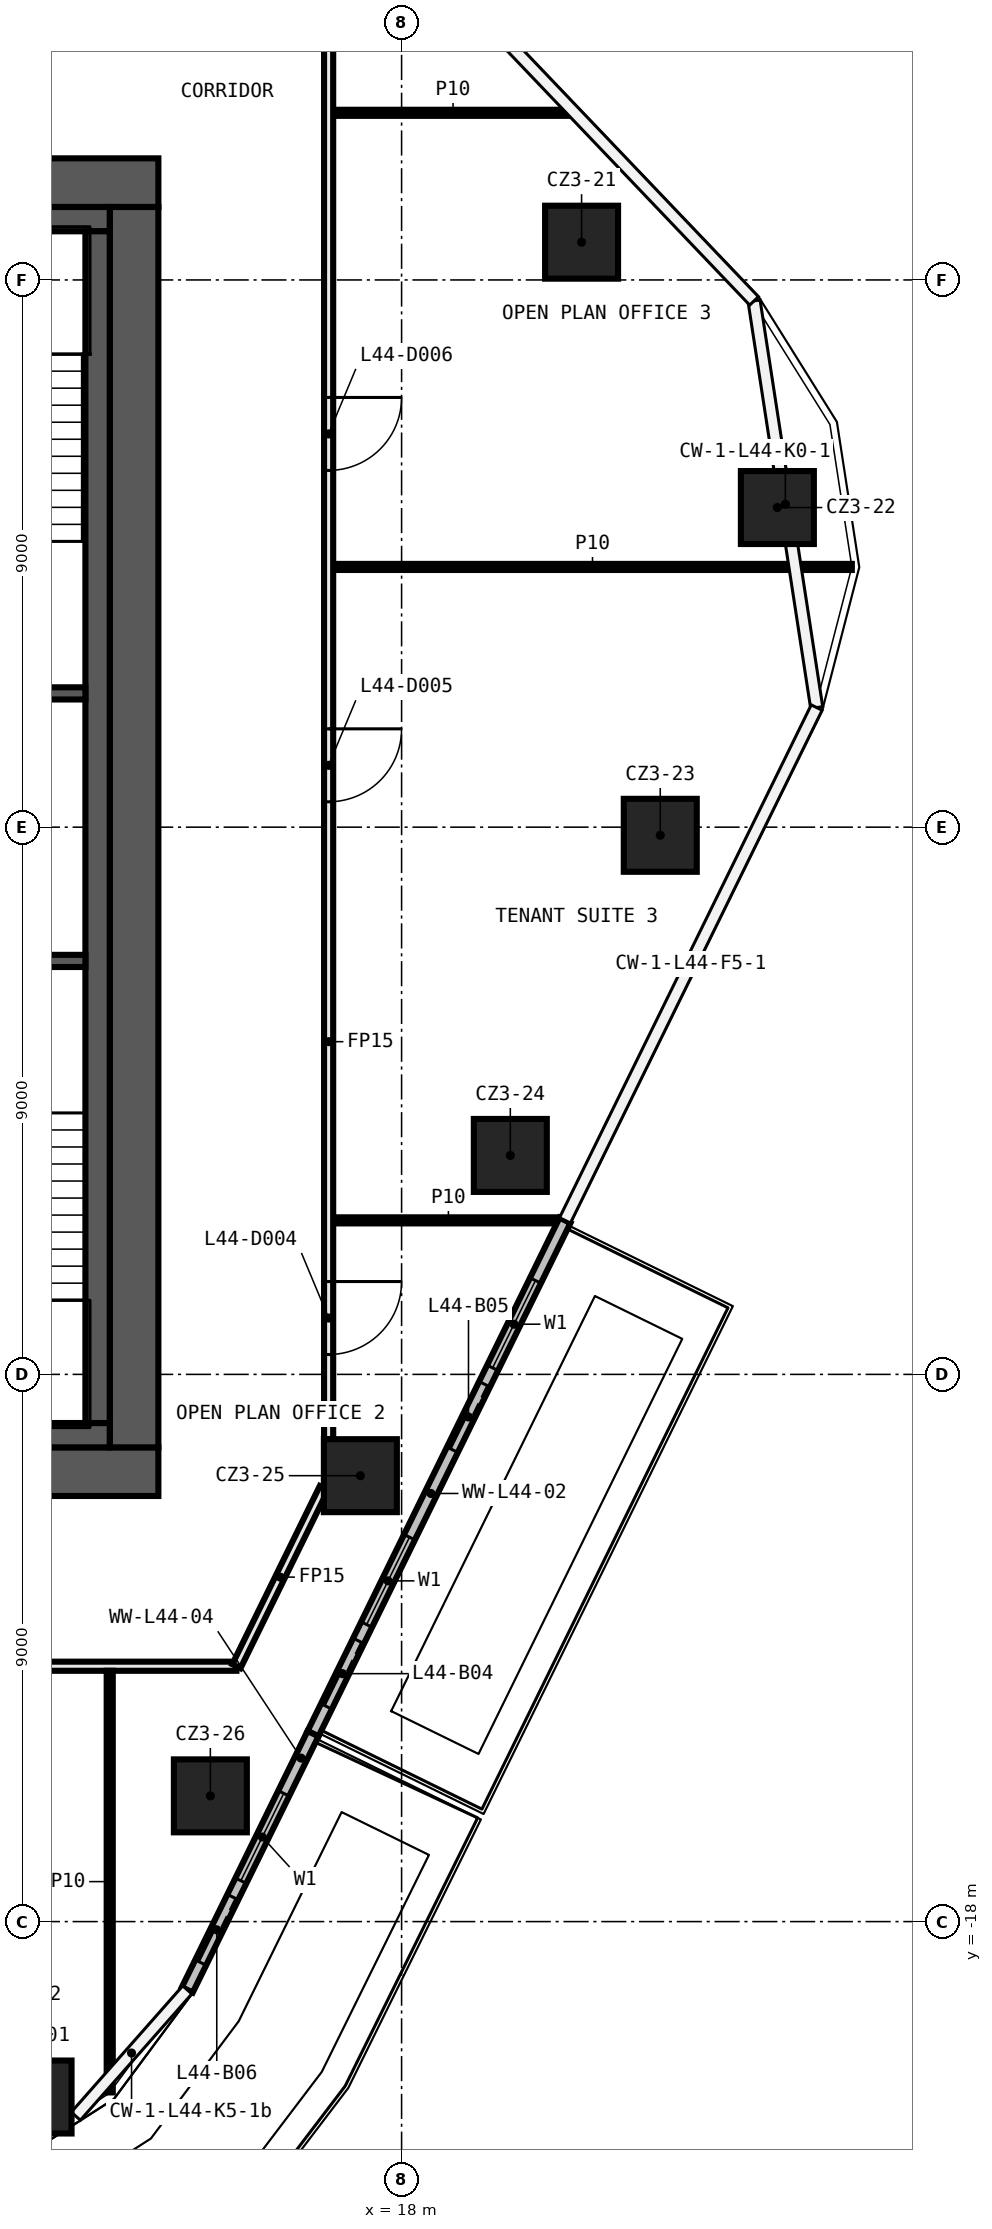
"""IFC4 building model, lengths in metres.
Left out: names, types, materials, properties, quantities, classifications, styles, units other than length and angle.
Written with IfcOpenShell. Run it as: python <this file> out.ifc"""

import sys

from ifc_helpers import new_model, si_unit, direction, frame, frame_2d, origin, origin_2d, place, context, subcontext, project, spatial, rectangle, extrude, element, fill, save


model = new_model("IFC4")
c1 = context("Model", 3, precision=1e-05, world=origin(), true_north=direction((0.0, 1.0)))
c2 = subcontext(c1, "Body", "Model", "MODEL_VIEW")
j1 = project(units=[si_unit("LENGTHUNIT", "METRE"), si_unit("PLANEANGLEUNIT", "RADIAN")], contexts=[c1])
p1 = place(None, origin())
s1 = spatial("IfcSite", under=j1, at=p1, CompositionType="ELEMENT")
p2 = place(p1, origin())
s2 = spatial("IfcBuilding", under=s1, at=p2, CompositionType="ELEMENT")
p3 = place(p2, frame((0.0, 0.0, 211.4)))
s3 = spatial("IfcBuildingStorey", under=s2, at=p3, CompositionType="ELEMENT", Elevation=211.4)
for number, where, z_axis, x_axis in (
    (1, (11.972, -20.885, 0.0), (0.0, 0.0, 1.0), (1.0, 0.0, 0.0)),
    (2, (20.96, 9.621, 0.0), (0.0, 0.0, 1.0), (1.0, 0.0, 0.0)),
    (3, (24.18, 5.257, 0.0), (0.0, 0.0, 1.0), (1.0, 0.0, 0.0)),
    (4, (22.254, -0.134, 0.0), (0.0, 0.0, 1.0), (1.0, 0.0, 0.0)),
    (5, (19.788, -5.399, 0.0), (0.0, 0.0, 1.0), (1.0, 0.0, 0.0)),
    (6, (17.322, -10.666, 0.0), (0.0, 0.0, 1.0), (1.0, 0.0, 0.0)),
    (7, (14.855, -15.932, 0.0), (0.0, 0.0, 1.0), (1.0, 0.0, 0.0)),
):
    element("IfcColumn", number, at=place(p3, frame(where, z_axis=z_axis, x_axis=x_axis)), inside=s3, PredefinedType="COLUMN", context=c2, shape_type="SweptSolid", body=[
        extrude(rectangle(XDim=1.2, YDim=1.2, at=origin_2d()), origin(), (0.0, 0.0, 1.0), 3.82),
    ])
p4 = place(p3, frame((15.283, -13.8, 0.0), z_axis=(0.0, 0.0, 1.0), x_axis=(-1.0, 0.0, 0.0)))
e8 = element("IfcWall", 8, at=p4, inside=s3, PredefinedType="PARTITIONING", context=c2, shape_type="SweptSolid", body=[
    extrude(rectangle(XDim=27.358, YDim=0.15, at=frame_2d((13.679, 0.0))), origin(), (0.0, 0.0, 1.0), 3.82),
])
p5 = place(p4, frame((20.117, 0.0, 0.0)))
e9 = element("IfcOpeningElement", 9, at=p5, cuts=e8, PredefinedType="OPENING", context=c2, shape_type="SweptSolid", body=[
    extrude(rectangle(XDim=1.2, YDim=2.1, at=frame_2d((0.6, 1.05))), frame((0.0, 0.085, 0.0), z_axis=(0.0, -1.0, 0.0), x_axis=(1.0, 0.0, 0.0)), (0.0, 0.0, 1.0), 0.17),
])
p6 = place(p4, frame((15.905, 0.0, 0.0)))
e10 = element("IfcOpeningElement", 10, at=p6, cuts=e8, PredefinedType="OPENING", context=c2, shape_type="SweptSolid", body=[
    extrude(rectangle(XDim=1.2, YDim=2.1, at=frame_2d((0.6, 1.05))), frame((0.0, 0.085, 0.0), z_axis=(0.0, -1.0, 0.0), x_axis=(1.0, 0.0, 0.0)), (0.0, 0.0, 1.0), 0.17),
])
p7 = place(p4, frame((7.48, 0.0, 0.0)))
e11 = element("IfcOpeningElement", 11, at=p7, cuts=e8, PredefinedType="OPENING", context=c2, shape_type="SweptSolid", body=[
    extrude(rectangle(XDim=1.2, YDim=2.1, at=frame_2d((0.6, 1.05))), frame((0.0, 0.085, 0.0), z_axis=(0.0, -1.0, 0.0), x_axis=(1.0, 0.0, 0.0)), (0.0, 0.0, 1.0), 0.17),
])
p8 = place(p3, frame((16.875, -6.467, 0.0), z_axis=(0.0, 0.0, 1.0), x_axis=(1.0, 0.0, 0.0)))
e12 = element("IfcWall", 12, at=p8, inside=s3, PredefinedType="PARTITIONING", context=c2, shape_type="SweptSolid", body=[
    extrude(rectangle(XDim=3.79, YDim=0.1, at=frame_2d((1.895, 0.0))), origin(), (0.0, 0.0, 1.0), 3.82),
])
p9 = place(p3, frame((16.875, 4.28, 0.0), z_axis=(0.0, 0.0, 1.0), x_axis=(1.0, 0.0, 0.0)))
e13 = element("IfcWall", 13, at=p9, inside=s3, PredefinedType="PARTITIONING", context=c2, shape_type="SweptSolid", body=[
    extrude(rectangle(XDim=8.529, YDim=0.1, at=frame_2d((4.265, 0.0))), origin(), (0.0, 0.0, 1.0), 3.82),
])
p10 = place(p3, frame((16.875, 11.749, 0.0), z_axis=(0.0, 0.0, 1.0), x_axis=(1.0, 0.0, 0.0)))
e14 = element("IfcWall", 14, at=p10, inside=s3, PredefinedType="PARTITIONING", context=c2, shape_type="SweptSolid", body=[
    extrude(rectangle(XDim=3.943, YDim=0.1, at=frame_2d((1.972, 0.0))), origin(), (0.0, 0.0, 1.0), 3.82),
])
p11 = place(p3, frame((15.283, -13.8, 0.0), z_axis=(0.0, 0.0, 1.0), x_axis=(0.440561446279, 0.897722458253, 0.0)))
e15 = element("IfcWall", 15, at=p11, inside=s3, PredefinedType="PARTITIONING", context=c2, shape_type="SweptSolid", body=[
    extrude(rectangle(XDim=3.265, YDim=0.15, at=frame_2d((1.633, 0.0))), origin(), (0.0, 0.0, 1.0), 3.82),
])
p12 = place(p3, frame((16.8, 13.106, 0.0), z_axis=(0.0, 0.0, 1.0), x_axis=(0.0, -1.0, 0.0)))
e16 = element("IfcWall", 16, at=p12, inside=s3, PredefinedType="PARTITIONING", context=c2, shape_type="SweptSolid", body=[
    extrude(rectangle(XDim=23.172, YDim=0.15, at=frame_2d((11.586, 0.0))), origin(), (0.0, 0.0, 1.0), 3.82),
])
p13 = place(p12, frame((20.579, 0.0, 0.0)))
e17 = element("IfcOpeningElement", 17, at=p13, cuts=e16, PredefinedType="OPENING", context=c2, shape_type="SweptSolid", body=[
    extrude(rectangle(XDim=1.2, YDim=2.1, at=frame_2d((0.6, 1.05))), frame((0.0, 0.085, 0.0), z_axis=(0.0, -1.0, 0.0), x_axis=(1.0, 0.0, 0.0)), (0.0, 0.0, 1.0), 0.17),
])
p14 = place(p12, frame((11.489, 0.0, 0.0)))
e18 = element("IfcOpeningElement", 18, at=p14, cuts=e16, PredefinedType="OPENING", context=c2, shape_type="SweptSolid", body=[
    extrude(rectangle(XDim=1.2, YDim=2.1, at=frame_2d((0.6, 1.05))), frame((0.0, 0.085, 0.0), z_axis=(0.0, -1.0, 0.0), x_axis=(1.0, 0.0, 0.0)), (0.0, 0.0, 1.0), 0.17),
])
p15 = place(p12, frame((6.039, 0.0, 0.0)))
e19 = element("IfcOpeningElement", 19, at=p15, cuts=e16, PredefinedType="OPENING", context=c2, shape_type="SweptSolid", body=[
    extrude(rectangle(XDim=1.2, YDim=2.1, at=frame_2d((0.6, 1.05))), frame((0.0, 0.085, 0.0), z_axis=(0.0, -1.0, 0.0), x_axis=(1.0, 0.0, 0.0)), (0.0, 0.0, 1.0), 0.17),
])
p16 = place(p3, frame((13.2, -20.81, 0.0), z_axis=(0.0, 0.0, 1.0), x_axis=(0.0, 1.0, 0.0)))
e20 = element("IfcWall", 20, at=p16, inside=s3, PredefinedType="PARTITIONING", context=c2, shape_type="SweptSolid", body=[
    extrude(rectangle(XDim=6.935, YDim=0.1, at=frame_2d((3.467, 0.0))), origin(), (0.0, 0.0, 1.0), 3.82),
])
p17 = place(p3, frame((16.543, -14.91, 0.0), z_axis=(0.0, 0.0, 1.0), x_axis=(0.440597504926, 0.897704761407, 0.0)))
e21 = element("IfcWall", 21, at=p17, inside=s3, PredefinedType="SOLIDWALL", context=c2, shape_type="SweptSolid", body=[
    extrude(rectangle(XDim=9.405, YDim=0.2, at=frame_2d((4.703, 0.0))), origin(), (0.0, 0.0, 1.0), 3.82),
])
p18 = place(p17, frame((2.0, 0.0, 0.6)))
e22 = element("IfcOpeningElement", 22, at=p18, cuts=e21, PredefinedType="OPENING", context=c2, shape_type="SweptSolid", body=[
    extrude(rectangle(XDim=1.6, YDim=2.4, at=frame_2d((0.8, 1.2))), frame((0.0, 0.11, 0.0), z_axis=(0.0, -1.0, 0.0), x_axis=(1.0, 0.0, 0.0)), (0.0, 0.0, 1.0), 0.22),
])
p19 = place(p17, frame((0.5, 0.0, 0.0)))
e23 = element("IfcOpeningElement", 23, at=p19, cuts=e21, PredefinedType="OPENING", context=c2, shape_type="SweptSolid", body=[
    extrude(rectangle(XDim=1.2, YDim=2.4, at=frame_2d((0.6, 1.2))), frame((0.0, 0.11, 0.0), z_axis=(0.0, -1.0, 0.0), x_axis=(1.0, 0.0, 0.0)), (0.0, 0.0, 1.0), 0.22),
])
p20 = place(p17, frame((6.702, 0.0, 0.6)))
e24 = element("IfcOpeningElement", 24, at=p20, cuts=e21, PredefinedType="OPENING", context=c2, shape_type="SweptSolid", body=[
    extrude(rectangle(XDim=1.6, YDim=2.4, at=frame_2d((0.8, 1.2))), frame((0.0, 0.11, 0.0), z_axis=(0.0, -1.0, 0.0), x_axis=(1.0, 0.0, 0.0)), (0.0, 0.0, 1.0), 0.22),
])
p21 = place(p17, frame((5.202, 0.0, 0.0)))
e25 = element("IfcOpeningElement", 25, at=p21, cuts=e21, PredefinedType="OPENING", context=c2, shape_type="SweptSolid", body=[
    extrude(rectangle(XDim=1.2, YDim=2.4, at=frame_2d((0.6, 1.2))), frame((0.0, 0.11, 0.0), z_axis=(0.0, -1.0, 0.0), x_axis=(1.0, 0.0, 0.0)), (0.0, 0.0, 1.0), 0.22),
])
p22 = place(p3, frame((14.476, -19.123, 0.0), z_axis=(0.0, 0.0, 1.0), x_axis=(0.440605358917, 0.897700906591, 0.0)))
e26 = element("IfcWall", 26, at=p22, inside=s3, PredefinedType="SOLIDWALL", context=c2, shape_type="SweptSolid", body=[
    extrude(rectangle(XDim=4.693, YDim=0.2, at=frame_2d((2.347, 0.0))), origin(), (0.0, 0.0, 1.0), 3.82),
])
p23 = place(p22, frame((2.0, 0.0, 0.6)))
e27 = element("IfcOpeningElement", 27, at=p23, cuts=e26, PredefinedType="OPENING", context=c2, shape_type="SweptSolid", body=[
    extrude(rectangle(XDim=1.6, YDim=2.4, at=frame_2d((0.8, 1.2))), frame((0.0, 0.11, 0.0), z_axis=(0.0, -1.0, 0.0), x_axis=(1.0, 0.0, 0.0)), (0.0, 0.0, 1.0), 0.22),
])
p24 = place(p22, frame((0.5, 0.0, 0.0)))
e28 = element("IfcOpeningElement", 28, at=p24, cuts=e26, PredefinedType="OPENING", context=c2, shape_type="SweptSolid", body=[
    extrude(rectangle(XDim=1.2, YDim=2.4, at=frame_2d((0.6, 1.2))), frame((0.0, 0.11, 0.0), z_axis=(0.0, -1.0, 0.0), x_axis=(1.0, 0.0, 0.0)), (0.0, 0.0, 1.0), 0.22),
])
p25 = place(p3, frame((-14.0, 10.6, 0.0), z_axis=(0.0, 0.0, 1.0), x_axis=(1.0, 0.0, 0.0)))
e29 = element("IfcWall", 29, at=p25, inside=s3, PredefinedType="SHEAR", context=c2, shape_type="SweptSolid", body=[
    extrude(rectangle(XDim=28.0, YDim=0.8, at=frame_2d((14.0, 0.0))), origin(), (0.0, 0.0, 1.0), 3.82),
])
p26 = place(p25, frame((15.9, 0.0, 0.0)))
e30 = element("IfcOpeningElement", 30, at=p26, cuts=e29, PredefinedType="OPENING", context=c2, shape_type="SweptSolid", body=[
    extrude(rectangle(XDim=1.6, YDim=2.1, at=frame_2d((0.8, 1.05))), frame((0.0, 0.41, 0.0), z_axis=(0.0, -1.0, 0.0), x_axis=(1.0, 0.0, 0.0)), (0.0, 0.0, 1.0), 0.82),
])
p27 = place(p3, frame((14.0, -10.6, 0.0), z_axis=(0.0, 0.0, 1.0), x_axis=(-1.0, 0.0, 0.0)))
e31 = element("IfcWall", 31, at=p27, inside=s3, PredefinedType="SHEAR", context=c2, shape_type="SweptSolid", body=[
    extrude(rectangle(XDim=28.0, YDim=0.8, at=frame_2d((14.0, 0.0))), origin(), (0.0, 0.0, 1.0), 3.82),
])
p28 = place(p27, frame((5.1, 0.0, 0.0)))
e32 = element("IfcOpeningElement", 32, at=p28, cuts=e31, PredefinedType="OPENING", context=c2, shape_type="SweptSolid", body=[
    extrude(rectangle(XDim=1.6, YDim=2.1, at=frame_2d((0.8, 1.05))), frame((0.0, 0.41, 0.0), z_axis=(0.0, -1.0, 0.0), x_axis=(1.0, 0.0, 0.0)), (0.0, 0.0, 1.0), 0.82),
])
p29 = place(p3, frame((13.6, 10.2, 0.0), z_axis=(0.0, 0.0, 1.0), x_axis=(0.0, -1.0, 0.0)))
e33 = element("IfcWall", 33, at=p29, inside=s3, PredefinedType="SHEAR", context=c2, shape_type="SweptSolid", body=[
    extrude(rectangle(XDim=20.4, YDim=0.8, at=frame_2d((10.2, 0.0))), origin(), (0.0, 0.0, 1.0), 3.82),
])
p30 = place(p3, frame((3.9, 10.0, 0.0), z_axis=(0.0, 0.0, 1.0), x_axis=(1.0, 0.0, 0.0)))
e34 = element("IfcWall", 34, at=p30, inside=s3, PredefinedType="SHEAR", context=c2, shape_type="SweptSolid", body=[
    extrude(rectangle(XDim=9.3, YDim=0.4, at=frame_2d((4.65, 0.0))), origin(), (0.0, 0.0, 1.0), 3.82),
])
p31 = place(p3, frame((13.2, -10.0, 0.0), z_axis=(0.0, 0.0, 1.0), x_axis=(-1.0, 0.0, 0.0)))
e35 = element("IfcWall", 35, at=p31, inside=s3, PredefinedType="SHEAR", context=c2, shape_type="SweptSolid", body=[
    extrude(rectangle(XDim=3.9, YDim=0.4, at=frame_2d((1.95, 0.0))), origin(), (0.0, 0.0, 1.0), 3.82),
])
p32 = place(p3, frame((13.0, 9.8, 0.0), z_axis=(0.0, 0.0, 1.0), x_axis=(0.0, -1.0, 0.0)))
e36 = element("IfcWall", 36, at=p32, inside=s3, PredefinedType="SHEAR", context=c2, shape_type="SweptSolid", body=[
    extrude(rectangle(XDim=19.6, YDim=0.4, at=frame_2d((9.8, 0.0))), origin(), (0.0, 0.0, 1.0), 3.82),
])
for number, where, z_axis, x_axis in (
    (37, (9.45, 2.2, 0.0), (0.0, 0.0, 1.0), (1.0, 0.0, 0.0)),
    (38, (9.45, -2.2, 0.0), (0.0, 0.0, 1.0), (1.0, 0.0, 0.0)),
):
    element("IfcWall", number, at=place(p3, frame(where, z_axis=z_axis, x_axis=x_axis)), inside=s3, PredefinedType="SHEAR", context=c2, shape_type="SweptSolid", body=[
        extrude(rectangle(XDim=3.35, YDim=0.2, at=frame_2d((1.675, 0.0))), origin(), (0.0, 0.0, 1.0), 3.82),
    ])
p33 = place(p13, origin())
e39 = element("IfcDoor", 39, at=p33, inside=s3, OperationType="SINGLE_SWING_LEFT", PredefinedType="DOOR", context=c2, shape_type="SweptSolid", body=[
    extrude(rectangle(XDim=1.2, YDim=2.1, at=frame_2d((0.6, 1.05))), frame((0.0, 0.025, 0.0), z_axis=(0.0, -1.0, 0.0), x_axis=(1.0, 0.0, 0.0)), (0.0, 0.0, 1.0), 0.05),
])
fill(e17, e39)
p34 = place(p14, origin())
e40 = element("IfcDoor", 40, at=p34, inside=s3, OperationType="SINGLE_SWING_RIGHT", PredefinedType="DOOR", context=c2, shape_type="SweptSolid", body=[
    extrude(rectangle(XDim=1.2, YDim=2.1, at=frame_2d((0.6, 1.05))), frame((0.0, 0.025, 0.0), z_axis=(0.0, -1.0, 0.0), x_axis=(1.0, 0.0, 0.0)), (0.0, 0.0, 1.0), 0.05),
])
fill(e18, e40)
p35 = place(p15, origin())
e41 = element("IfcDoor", 41, at=p35, inside=s3, OperationType="SINGLE_SWING_LEFT", PredefinedType="DOOR", context=c2, shape_type="SweptSolid", body=[
    extrude(rectangle(XDim=1.2, YDim=2.1, at=frame_2d((0.6, 1.05))), frame((0.0, 0.025, 0.0), z_axis=(0.0, -1.0, 0.0), x_axis=(1.0, 0.0, 0.0)), (0.0, 0.0, 1.0), 0.05),
])
fill(e19, e41)
p36 = place(p18, origin())
e42 = element("IfcWindow", 42, at=p36, inside=s3, PartitioningType="SINGLE_PANEL", PredefinedType="WINDOW", context=c2, shape_type="SweptSolid", body=[
    extrude(rectangle(XDim=1.6, YDim=2.4, at=frame_2d((0.8, 1.2))), frame((0.0, 0.03, 0.0), z_axis=(0.0, -1.0, 0.0), x_axis=(1.0, 0.0, 0.0)), (0.0, 0.0, 1.0), 0.06),
])
fill(e22, e42)
p37 = place(p19, origin())
e43 = element("IfcDoor", 43, at=p37, inside=s3, OperationType="SLIDING_TO_LEFT", PredefinedType="DOOR", context=c2, shape_type="SweptSolid", body=[
    extrude(rectangle(XDim=1.2, YDim=2.4, at=frame_2d((0.6, 1.2))), frame((0.0, 0.025, 0.0), z_axis=(0.0, -1.0, 0.0), x_axis=(1.0, 0.0, 0.0)), (0.0, 0.0, 1.0), 0.05),
])
fill(e23, e43)
p38 = place(p20, origin())
e44 = element("IfcWindow", 44, at=p38, inside=s3, PartitioningType="SINGLE_PANEL", PredefinedType="WINDOW", context=c2, shape_type="SweptSolid", body=[
    extrude(rectangle(XDim=1.6, YDim=2.4, at=frame_2d((0.8, 1.2))), frame((0.0, 0.03, 0.0), z_axis=(0.0, -1.0, 0.0), x_axis=(1.0, 0.0, 0.0)), (0.0, 0.0, 1.0), 0.06),
])
fill(e24, e44)
p39 = place(p21, origin())
e45 = element("IfcDoor", 45, at=p39, inside=s3, OperationType="SLIDING_TO_LEFT", PredefinedType="DOOR", context=c2, shape_type="SweptSolid", body=[
    extrude(rectangle(XDim=1.2, YDim=2.4, at=frame_2d((0.6, 1.2))), frame((0.0, 0.025, 0.0), z_axis=(0.0, -1.0, 0.0), x_axis=(1.0, 0.0, 0.0)), (0.0, 0.0, 1.0), 0.05),
])
fill(e25, e45)
p40 = place(p23, origin())
e46 = element("IfcWindow", 46, at=p40, inside=s3, PartitioningType="SINGLE_PANEL", PredefinedType="WINDOW", context=c2, shape_type="SweptSolid", body=[
    extrude(rectangle(XDim=1.6, YDim=2.4, at=frame_2d((0.8, 1.2))), frame((0.0, 0.03, 0.0), z_axis=(0.0, -1.0, 0.0), x_axis=(1.0, 0.0, 0.0)), (0.0, 0.0, 1.0), 0.06),
])
fill(e27, e46)
p41 = place(p24, origin())
e47 = element("IfcDoor", 47, at=p41, inside=s3, OperationType="SLIDING_TO_LEFT", PredefinedType="DOOR", context=c2, shape_type="SweptSolid", body=[
    extrude(rectangle(XDim=1.2, YDim=2.4, at=frame_2d((0.6, 1.2))), frame((0.0, 0.025, 0.0), z_axis=(0.0, -1.0, 0.0), x_axis=(1.0, 0.0, 0.0)), (0.0, 0.0, 1.0), 0.05),
])
fill(e28, e47)
save(model, sys.argv[1])
